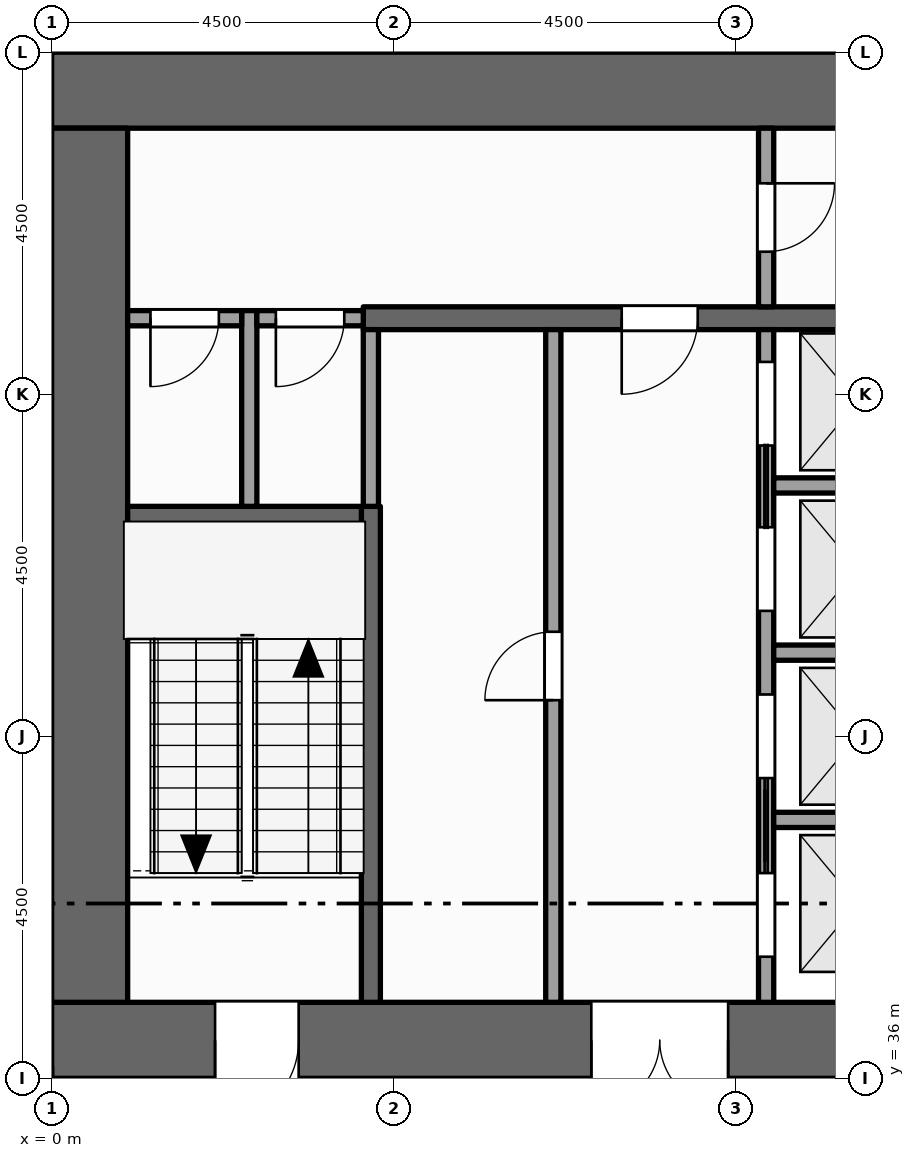
"""IFC4 building model, lengths in metres.
Left out: names, types, materials, properties, quantities, classifications, styles, units other than length and angle.
Written with IfcOpenShell. Run it as: python <this file> out.ifc"""

import sys

from ifc_helpers import new_model, si_unit, direction, frame, frame_2d, origin, place, context, subcontext, project, spatial, rectangle, extrude, element, fill, save


model = new_model("IFC4")
c1 = context("Model", 3, precision=1e-05, world=origin(), true_north=direction((0.0, 1.0)))
c2 = subcontext(c1, "Body", "Model", "MODEL_VIEW")
j1 = project(units=[si_unit("LENGTHUNIT", "METRE"), si_unit("PLANEANGLEUNIT", "RADIAN")], contexts=[c1])
p1 = place(None, origin())
s1 = spatial("IfcSite", under=j1, at=p1, CompositionType="ELEMENT")
p2 = place(p1, origin())
s2 = spatial("IfcBuilding", under=s1, at=p2, CompositionType="ELEMENT")
p3 = place(p2, frame((0.0, 0.0, 171.0)))
s3 = spatial("IfcBuildingStorey", under=s2, at=p3, CompositionType="ELEMENT", Elevation=171.0)
p4 = place(p3, frame((0.0, 36.5, -0.15), z_axis=(0.0, 0.0, 1.0), x_axis=(1.0, 0.0, 0.0)))
e1 = element("IfcWall", 1, at=p4, inside=s3, PredefinedType="SHEAR", context=c2, shape_type="SweptSolid", body=[
    extrude(rectangle(XDim=22.5, YDim=1.0, at=frame_2d((11.25, 0.0))), origin(), (0.0, 0.0, 1.0), 4.0),
])
p5 = place(p4, frame((7.1, 0.0, 0.15)))
e2 = element("IfcOpeningElement", 2, at=p5, cuts=e1, PredefinedType="OPENING", context=c2, shape_type="SweptSolid", body=[
    extrude(rectangle(XDim=1.8, YDim=2.1, at=frame_2d((0.9, 1.05))), frame((0.0, 0.51, 0.0), z_axis=(0.0, -1.0, 0.0), x_axis=(1.0, 0.0, 0.0)), (0.0, 0.0, 1.0), 1.02),
])
p6 = place(p4, frame((13.15, 0.0, 0.15)))
e3 = element("IfcOpeningElement", 3, at=p6, cuts=e1, PredefinedType="OPENING", context=c2, shape_type="SweptSolid", body=[
    extrude(rectangle(XDim=1.1, YDim=2.1, at=frame_2d((0.55, 1.05))), frame((0.0, 0.51, 0.0), z_axis=(0.0, -1.0, 0.0), x_axis=(1.0, 0.0, 0.0)), (0.0, 0.0, 1.0), 1.02),
])
p7 = place(p4, frame((2.15, 0.0, 0.15)))
e4 = element("IfcOpeningElement", 4, at=p7, cuts=e1, PredefinedType="OPENING", context=c2, shape_type="SweptSolid", body=[
    extrude(rectangle(XDim=1.1, YDim=2.1, at=frame_2d((0.55, 1.05))), frame((0.0, 0.51, 0.0), z_axis=(0.0, -1.0, 0.0), x_axis=(1.0, 0.0, 0.0)), (0.0, 0.0, 1.0), 1.02),
])
p8 = place(p4, frame((19.35, 0.0, 0.15)))
e5 = element("IfcOpeningElement", 5, at=p8, cuts=e1, PredefinedType="OPENING", context=c2, shape_type="SweptSolid", body=[
    extrude(rectangle(XDim=1.1, YDim=2.1, at=frame_2d((0.55, 1.05))), frame((0.0, 0.51, 0.0), z_axis=(0.0, -1.0, 0.0), x_axis=(1.0, 0.0, 0.0)), (0.0, 0.0, 1.0), 1.02),
])
p9 = place(p3, frame((0.0, 49.0, -0.15), z_axis=(0.0, 0.0, 1.0), x_axis=(1.0, 0.0, 0.0)))
e6 = element("IfcWall", 6, at=p9, inside=s3, PredefinedType="SHEAR", context=c2, shape_type="SweptSolid", body=[
    extrude(rectangle(XDim=22.5, YDim=1.0, at=frame_2d((11.25, 0.0))), origin(), (0.0, 0.0, 1.0), 4.0),
])
p10 = place(p3, frame((0.5, 37.0, -0.15), z_axis=(0.0, 0.0, 1.0), x_axis=(0.0, 1.0, 0.0)))
e7 = element("IfcWall", 7, at=p10, inside=s3, PredefinedType="SHEAR", context=c2, shape_type="SweptSolid", body=[
    extrude(rectangle(XDim=11.5, YDim=1.0, at=frame_2d((5.75, 0.0))), origin(), (0.0, 0.0, 1.0), 4.0),
])
p11 = place(p3, frame((0.0, 36.0, 0.0), z_axis=(0.0, 0.0, 1.0), x_axis=(-1.0, 0.0, 0.0)))
e8 = element("IfcWall", 8, at=p11, inside=s3, PredefinedType="STANDARD", context=c2, shape_type="SweptSolid", body=[
    extrude(rectangle(XDim=1.05, YDim=0.3, at=frame_2d((0.525, 0.0))), origin(), (0.0, 0.0, 1.0), 2.87),
])
p12 = place(p3, frame((2.6, 43.525, 0.0), z_axis=(0.0, 0.0, 1.0), x_axis=(0.0, 1.0, 0.0)))
e9 = element("IfcWall", 9, at=p12, inside=s3, PredefinedType="PARTITIONING", context=c2, shape_type="SweptSolid", body=[
    extrude(rectangle(XDim=2.575, YDim=0.2, at=frame_2d((1.288, 0.0))), origin(), (0.0, 0.0, 1.0), 3.85),
])
p13 = place(p3, frame((4.2, 37.0, 0.0), z_axis=(0.0, 0.0, 1.0), x_axis=(0.0, 1.0, 0.0)))
e10 = element("IfcWall", 10, at=p13, inside=s3, PredefinedType="SHEAR", context=c2, shape_type="SweptSolid", body=[
    extrude(rectangle(XDim=6.525, YDim=0.25, at=frame_2d((3.262, 0.0))), origin(), (0.0, 0.0, 1.0), 3.85),
])
p14 = place(p3, frame((4.2, 43.525, 0.0), z_axis=(0.0, 0.0, 1.0), x_axis=(0.0, 1.0, 0.0)))
e11 = element("IfcWall", 11, at=p14, inside=s3, PredefinedType="PARTITIONING", context=c2, shape_type="SweptSolid", body=[
    extrude(rectangle(XDim=2.325, YDim=0.2, at=frame_2d((1.163, 0.0))), origin(), (0.0, 0.0, 1.0), 3.85),
])
p15 = place(p3, frame((6.6, 37.0, 0.0), z_axis=(0.0, 0.0, 1.0), x_axis=(0.0, 1.0, 0.0)))
e12 = element("IfcWall", 12, at=p15, inside=s3, PredefinedType="PARTITIONING", context=c2, shape_type="SweptSolid", body=[
    extrude(rectangle(XDim=8.85, YDim=0.2, at=frame_2d((4.425, 0.0))), origin(), (0.0, 0.0, 1.0), 3.85),
])
p16 = place(p15, frame((3.975, 0.0, 0.0)))
e13 = element("IfcOpeningElement", 13, at=p16, cuts=e12, PredefinedType="OPENING", context=c2, shape_type="SweptSolid", body=[
    extrude(rectangle(XDim=0.9, YDim=2.1, at=frame_2d((0.45, 1.05))), frame((0.0, 0.11, 0.0), z_axis=(0.0, -1.0, 0.0), x_axis=(1.0, 0.0, 0.0)), (0.0, 0.0, 1.0), 0.22),
])
p17 = place(p3, frame((9.4, 37.0, 0.0), z_axis=(0.0, 0.0, 1.0), x_axis=(0.0, 1.0, 0.0)))
e14 = element("IfcWall", 14, at=p17, inside=s3, PredefinedType="SOLIDWALL", context=c2, shape_type="SweptSolid", body=[
    extrude(rectangle(XDim=8.85, YDim=0.2, at=frame_2d((4.425, 0.0))), origin(), (0.0, 0.0, 1.0), 3.85),
])
p18 = place(p17, frame((0.6, 0.0, 0.012)))
e15 = element("IfcOpeningElement", 15, at=p18, cuts=e14, PredefinedType="OPENING", context=c2, shape_type="SweptSolid", body=[
    extrude(rectangle(XDim=1.1, YDim=2.1, at=frame_2d((0.55, 1.05))), frame((0.0, 0.11, 0.0), z_axis=(0.0, -1.0, 0.0), x_axis=(1.0, 0.0, 0.0)), (0.0, 0.0, 1.0), 0.22),
])
p19 = place(p17, frame((2.95, 0.0, 0.012)))
e16 = element("IfcOpeningElement", 16, at=p19, cuts=e14, PredefinedType="OPENING", context=c2, shape_type="SweptSolid", body=[
    extrude(rectangle(XDim=1.1, YDim=2.1, at=frame_2d((0.55, 1.05))), frame((0.0, 0.11, 0.0), z_axis=(0.0, -1.0, 0.0), x_axis=(1.0, 0.0, 0.0)), (0.0, 0.0, 1.0), 0.22),
])
p20 = place(p17, frame((5.15, 0.0, 0.012)))
e17 = element("IfcOpeningElement", 17, at=p20, cuts=e14, PredefinedType="OPENING", context=c2, shape_type="SweptSolid", body=[
    extrude(rectangle(XDim=1.1, YDim=2.1, at=frame_2d((0.55, 1.05))), frame((0.0, 0.11, 0.0), z_axis=(0.0, -1.0, 0.0), x_axis=(1.0, 0.0, 0.0)), (0.0, 0.0, 1.0), 0.22),
])
p21 = place(p17, frame((7.325, 0.0, 0.012)))
e18 = element("IfcOpeningElement", 18, at=p21, cuts=e14, PredefinedType="OPENING", context=c2, shape_type="SweptSolid", body=[
    extrude(rectangle(XDim=1.1, YDim=2.1, at=frame_2d((0.55, 1.05))), frame((0.0, 0.11, 0.0), z_axis=(0.0, -1.0, 0.0), x_axis=(1.0, 0.0, 0.0)), (0.0, 0.0, 1.0), 0.22),
])
p22 = place(p3, frame((9.4, 46.15, 0.0), z_axis=(0.0, 0.0, 1.0), x_axis=(0.0, 1.0, 0.0)))
e19 = element("IfcWall", 19, at=p22, inside=s3, PredefinedType="PARTITIONING", context=c2, shape_type="SweptSolid", body=[
    extrude(rectangle(XDim=2.35, YDim=0.2, at=frame_2d((1.175, 0.0))), origin(), (0.0, 0.0, 1.0), 3.85),
])
p23 = place(p22, frame((0.725, 0.0, 0.0)))
e20 = element("IfcOpeningElement", 20, at=p23, cuts=e19, PredefinedType="OPENING", context=c2, shape_type="SweptSolid", body=[
    extrude(rectangle(XDim=0.9, YDim=2.1, at=frame_2d((0.45, 1.05))), frame((0.0, 0.11, 0.0), z_axis=(0.0, -1.0, 0.0), x_axis=(1.0, 0.0, 0.0)), (0.0, 0.0, 1.0), 0.22),
])
for number, where, z_axis, x_axis in (
    (21, (9.5, 39.4, 0.0), (0.0, 0.0, 1.0), (1.0, 0.0, 0.0)),
    (22, (9.5, 41.6, 0.0), (0.0, 0.0, 1.0), (1.0, 0.0, 0.0)),
):
    element("IfcWall", number, at=place(p3, frame(where, z_axis=z_axis, x_axis=x_axis)), inside=s3, PredefinedType="SOLIDWALL", context=c2, shape_type="SweptSolid", body=[
        extrude(rectangle(XDim=2.2, YDim=0.2, at=frame_2d((1.1, 0.0))), origin(), (0.0, 0.0, 1.0), 3.85),
    ])
p24 = place(p3, frame((1.0, 43.4, 0.0), z_axis=(0.0, 0.0, 1.0), x_axis=(1.0, 0.0, 0.0)))
e23 = element("IfcWall", 23, at=p24, inside=s3, PredefinedType="SHEAR", context=c2, shape_type="SweptSolid", body=[
    extrude(rectangle(XDim=3.075, YDim=0.25, at=frame_2d((1.538, 0.0))), origin(), (0.0, 0.0, 1.0), 3.85),
])
p25 = place(p3, frame((9.5, 43.8, 0.0), z_axis=(0.0, 0.0, 1.0), x_axis=(1.0, 0.0, 0.0)))
e24 = element("IfcWall", 24, at=p25, inside=s3, PredefinedType="SOLIDWALL", context=c2, shape_type="SweptSolid", body=[
    extrude(rectangle(XDim=2.2, YDim=0.2, at=frame_2d((1.1, 0.0))), origin(), (0.0, 0.0, 1.0), 3.85),
])
p26 = place(p3, frame((1.0, 46.0, 0.0), z_axis=(0.0, 0.0, 1.0), x_axis=(1.0, 0.0, 0.0)))
e25 = element("IfcWall", 25, at=p26, inside=s3, PredefinedType="PARTITIONING", context=c2, shape_type="SweptSolid", body=[
    extrude(rectangle(XDim=1.5, YDim=0.2, at=frame_2d((0.75, 0.0))), origin(), (0.0, 0.0, 1.0), 3.85),
])
p27 = place(p26, frame((0.3, 0.0, 0.0)))
e26 = element("IfcOpeningElement", 26, at=p27, cuts=e25, PredefinedType="OPENING", context=c2, shape_type="SweptSolid", body=[
    extrude(rectangle(XDim=0.9, YDim=2.1, at=frame_2d((0.45, 1.05))), frame((0.0, 0.11, 0.0), z_axis=(0.0, -1.0, 0.0), x_axis=(1.0, 0.0, 0.0)), (0.0, 0.0, 1.0), 0.22),
])
p28 = place(p3, frame((2.7, 46.0, 0.0), z_axis=(0.0, 0.0, 1.0), x_axis=(1.0, 0.0, 0.0)))
e27 = element("IfcWall", 27, at=p28, inside=s3, PredefinedType="PARTITIONING", context=c2, shape_type="SweptSolid", body=[
    extrude(rectangle(XDim=1.4, YDim=0.2, at=frame_2d((0.7, 0.0))), origin(), (0.0, 0.0, 1.0), 3.85),
])
p29 = place(p28, frame((0.25, 0.0, 0.0)))
e28 = element("IfcOpeningElement", 28, at=p29, cuts=e27, PredefinedType="OPENING", context=c2, shape_type="SweptSolid", body=[
    extrude(rectangle(XDim=0.9, YDim=2.1, at=frame_2d((0.45, 1.05))), frame((0.0, 0.11, 0.0), z_axis=(0.0, -1.0, 0.0), x_axis=(1.0, 0.0, 0.0)), (0.0, 0.0, 1.0), 0.22),
])
p30 = place(p3, frame((4.1, 46.0, 0.0), z_axis=(0.0, 0.0, 1.0), x_axis=(1.0, 0.0, 0.0)))
e29 = element("IfcWall", 29, at=p30, inside=s3, PredefinedType="SHEAR", context=c2, shape_type="SweptSolid", body=[
    extrude(rectangle(XDim=14.5, YDim=0.3, at=frame_2d((7.25, 0.0))), origin(), (0.0, 0.0, 1.0), 3.85),
])
p31 = place(p30, frame((3.4, 0.0, 0.0)))
e30 = element("IfcOpeningElement", 30, at=p31, cuts=e29, PredefinedType="OPENING", context=c2, shape_type="SweptSolid", body=[
    extrude(rectangle(XDim=1.0, YDim=2.1, at=frame_2d((0.5, 1.05))), frame((0.0, 0.16, 0.0), z_axis=(0.0, -1.0, 0.0), x_axis=(1.0, 0.0, 0.0)), (0.0, 0.0, 1.0), 0.32),
])
p32 = place(p30, frame((9.1, 0.0, 0.0)))
e31 = element("IfcOpeningElement", 31, at=p32, cuts=e29, PredefinedType="OPENING", context=c2, shape_type="SweptSolid", body=[
    extrude(rectangle(XDim=1.0, YDim=2.1, at=frame_2d((0.5, 1.05))), frame((0.0, 0.16, 0.0), z_axis=(0.0, -1.0, 0.0), x_axis=(1.0, 0.0, 0.0)), (0.0, 0.0, 1.0), 0.32),
])
p33 = place(p18, origin())
e32 = element("IfcDoor", 32, at=p33, inside=s3, OperationType="SLIDING_TO_RIGHT", PredefinedType="DOOR", context=c2, shape_type="SweptSolid", body=[
    extrude(rectangle(XDim=1.1, YDim=2.1, at=frame_2d((0.55, 1.05))), frame((0.0, 0.025, 0.0), z_axis=(0.0, -1.0, 0.0), x_axis=(1.0, 0.0, 0.0)), (0.0, 0.0, 1.0), 0.05),
])
fill(e15, e32)
p34 = place(p19, origin())
e33 = element("IfcDoor", 33, at=p34, inside=s3, OperationType="SLIDING_TO_LEFT", PredefinedType="DOOR", context=c2, shape_type="SweptSolid", body=[
    extrude(rectangle(XDim=1.1, YDim=2.1, at=frame_2d((0.55, 1.05))), frame((0.0, 0.025, 0.0), z_axis=(0.0, -1.0, 0.0), x_axis=(1.0, 0.0, 0.0)), (0.0, 0.0, 1.0), 0.05),
])
fill(e16, e33)
p35 = place(p20, origin())
e34 = element("IfcDoor", 34, at=p35, inside=s3, OperationType="SLIDING_TO_RIGHT", PredefinedType="DOOR", context=c2, shape_type="SweptSolid", body=[
    extrude(rectangle(XDim=1.1, YDim=2.1, at=frame_2d((0.55, 1.05))), frame((0.0, 0.025, 0.0), z_axis=(0.0, -1.0, 0.0), x_axis=(1.0, 0.0, 0.0)), (0.0, 0.0, 1.0), 0.05),
])
fill(e17, e34)
p36 = place(p21, origin())
e35 = element("IfcDoor", 35, at=p36, inside=s3, OperationType="SLIDING_TO_LEFT", PredefinedType="DOOR", context=c2, shape_type="SweptSolid", body=[
    extrude(rectangle(XDim=1.1, YDim=2.1, at=frame_2d((0.55, 1.05))), frame((0.0, 0.025, 0.0), z_axis=(0.0, -1.0, 0.0), x_axis=(1.0, 0.0, 0.0)), (0.0, 0.0, 1.0), 0.05),
])
fill(e18, e35)
p37 = place(p5, origin())
e36 = element("IfcDoor", 36, at=p37, inside=s3, OperationType="DOUBLE_DOOR_SINGLE_SWING", PredefinedType="DOOR", context=c2, shape_type="SweptSolid", body=[
    extrude(rectangle(XDim=1.8, YDim=2.1, at=frame_2d((0.9, 1.05))), frame((0.0, 0.025, 0.0), z_axis=(0.0, -1.0, 0.0), x_axis=(1.0, 0.0, 0.0)), (0.0, 0.0, 1.0), 0.05),
])
fill(e2, e36)
p38 = place(p31, origin())
e37 = element("IfcDoor", 37, at=p38, inside=s3, OperationType="SINGLE_SWING_LEFT", PredefinedType="DOOR", context=c2, shape_type="SweptSolid", body=[
    extrude(rectangle(XDim=1.0, YDim=2.1, at=frame_2d((0.5, 1.05))), frame((0.0, 0.025, 0.0), z_axis=(0.0, -1.0, 0.0), x_axis=(1.0, 0.0, 0.0)), (0.0, 0.0, 1.0), 0.05),
])
fill(e30, e37)
p39 = place(p23, origin())
e38 = element("IfcDoor", 38, at=p39, inside=s3, OperationType="SINGLE_SWING_RIGHT", PredefinedType="DOOR", context=c2, shape_type="SweptSolid", body=[
    extrude(rectangle(XDim=0.9, YDim=2.1, at=frame_2d((0.45, 1.05))), frame((0.0, 0.025, 0.0), z_axis=(0.0, -1.0, 0.0), x_axis=(1.0, 0.0, 0.0)), (0.0, 0.0, 1.0), 0.05),
])
fill(e20, e38)
p40 = place(p7, origin())
e39 = element("IfcDoor", 39, at=p40, inside=s3, OperationType="SINGLE_SWING_LEFT", PredefinedType="DOOR", context=c2, shape_type="SweptSolid", body=[
    extrude(rectangle(XDim=1.1, YDim=2.1, at=frame_2d((0.55, 1.05))), frame((0.0, 0.025, 0.0), z_axis=(0.0, -1.0, 0.0), x_axis=(1.0, 0.0, 0.0)), (0.0, 0.0, 1.0), 0.05),
])
fill(e4, e39)
p41 = place(p27, origin())
e40 = element("IfcDoor", 40, at=p41, inside=s3, OperationType="SINGLE_SWING_LEFT", PredefinedType="DOOR", context=c2, shape_type="SweptSolid", body=[
    extrude(rectangle(XDim=0.9, YDim=2.1, at=frame_2d((0.45, 1.05))), frame((0.0, 0.025, 0.0), z_axis=(0.0, -1.0, 0.0), x_axis=(1.0, 0.0, 0.0)), (0.0, 0.0, 1.0), 0.05),
])
fill(e26, e40)
p42 = place(p29, origin())
e41 = element("IfcDoor", 41, at=p42, inside=s3, OperationType="SINGLE_SWING_LEFT", PredefinedType="DOOR", context=c2, shape_type="SweptSolid", body=[
    extrude(rectangle(XDim=0.9, YDim=2.1, at=frame_2d((0.45, 1.05))), frame((0.0, 0.025, 0.0), z_axis=(0.0, -1.0, 0.0), x_axis=(1.0, 0.0, 0.0)), (0.0, 0.0, 1.0), 0.05),
])
fill(e28, e41)
p43 = place(p16, origin())
e42 = element("IfcDoor", 42, at=p43, inside=s3, OperationType="SINGLE_SWING_LEFT", PredefinedType="DOOR", context=c2, shape_type="SweptSolid", body=[
    extrude(rectangle(XDim=0.9, YDim=2.1, at=frame_2d((0.45, 1.05))), frame((0.0, 0.025, 0.0), z_axis=(0.0, -1.0, 0.0), x_axis=(1.0, 0.0, 0.0)), (0.0, 0.0, 1.0), 0.05),
])
fill(e13, e42)
save(model, sys.argv[1])
